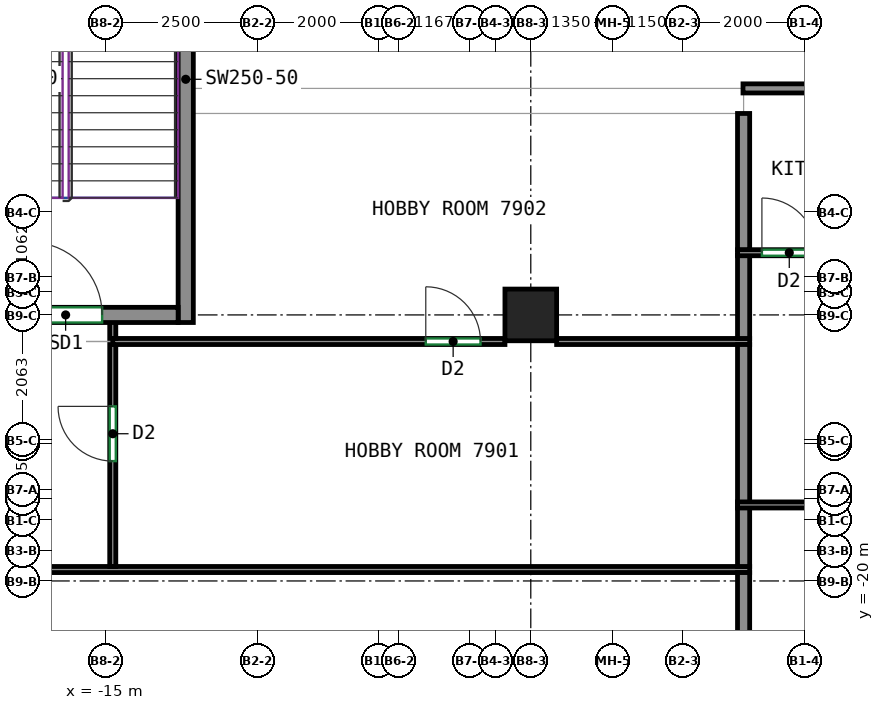
"""IFC4 building model, lengths in metres.
Left out: names, types, materials, properties, quantities, classifications, styles, units other than length and angle.
Written with IfcOpenShell. Run it as: python <this file> out.ifc"""

import sys

from ifc_helpers import new_model, si_unit, direction, frame, frame_2d, origin, origin_2d, place, context, subcontext, project, spatial, rectangle, extrude, source, transform, mapped, element, fill, save


model = new_model("IFC4")
c1 = context("Model", 3, precision=1e-05, world=origin(), true_north=direction((0.0, 1.0)))
c2 = subcontext(c1, "Body", "Model", "MODEL_VIEW")
j1 = project(units=[si_unit("LENGTHUNIT", "METRE"), si_unit("PLANEANGLEUNIT", "RADIAN")], contexts=[c1])
p1 = place(None, origin())
s1 = spatial("IfcSite", under=j1, at=p1, CompositionType="ELEMENT")
p2 = place(p1, origin())
s2 = spatial("IfcBuilding", under=s1, at=p2, CompositionType="ELEMENT")
p3 = place(p2, frame((0.0, 0.0, 315.4)))
s3 = spatial("IfcBuildingStorey", under=s2, at=p3, CompositionType="ELEMENT", Elevation=315.4)
m1 = source(origin(), c2, "Body", "SweptSolid", [
    extrude(rectangle(XDim=0.85, YDim=0.85, at=origin_2d()), origin(), (0.0, 0.0, 1.0), 3.0),
])
p4 = place(p3, frame((-8.0, -15.625, 0.0), z_axis=(0.0, 0.0, 1.0), x_axis=(1.0, 0.0, 0.0)))
e1 = element("IfcColumn", 1, at=p4, inside=s3, PredefinedType="COLUMN", context=c2, shape_type="MappedRepresentation", body=[
    mapped(m1, transform((0.0, 0.0, 0.0))),
])
m2 = source(origin(), c2, "Body", "SweptSolid", [
    extrude(rectangle(XDim=8.0, YDim=0.25, at=frame_2d((4.0, 0.0))), origin(), (0.0, 0.0, 1.0), 3.0),
])
p5 = place(p3, frame((-13.675, -15.75, 0.0), z_axis=(0.0, 0.0, 1.0), x_axis=(0.0, 1.0, 0.0)))
e2 = element("IfcWall", 2, at=p5, inside=s3, PredefinedType="SHEAR", context=c2, shape_type="MappedRepresentation", body=[
    mapped(m2, transform((0.0, 0.0, 0.0))),
])
m3 = source(origin(), c2, "Body", "SweptSolid", [
    extrude(rectangle(XDim=3.7, YDim=0.25, at=frame_2d((1.85, 0.0))), origin(), (0.0, 0.0, 1.0), 3.0),
])
p6 = place(p3, frame((-17.5, -15.625, 0.0), z_axis=(0.0, 0.0, 1.0), x_axis=(1.0, 0.0, 0.0)))
e3 = element("IfcWall", 3, at=p6, inside=s3, PredefinedType="SHEAR", context=c2, shape_type="MappedRepresentation", body=[
    mapped(m3, transform((0.0, 0.0, 0.0))),
])
p7 = place(p6, frame((1.25, 0.0, 0.0)))
e4 = element("IfcOpeningElement", 4, at=p7, cuts=e3, PredefinedType="OPENING", context=c2, shape_type="SweptSolid", body=[
    extrude(rectangle(XDim=1.2, YDim=2.1, at=frame_2d((0.6, 1.05))), frame((0.0, 0.135, 0.0), z_axis=(0.0, -1.0, 0.0), x_axis=(1.0, 0.0, 0.0)), (0.0, 0.0, 1.0), 0.27),
])
p8 = place(p3, frame((-4.51, -11.9, 0.0), z_axis=(0.0, 0.0, 1.0), x_axis=(1.0, 0.0, 0.0)))
e5 = element("IfcWall", 5, at=p8, inside=s3, PredefinedType="PARTITIONING", context=c2, shape_type="SweptSolid", body=[
    extrude(rectangle(XDim=22.26, YDim=0.15, at=frame_2d((11.13, 0.0))), origin(), (0.0, 0.0, 1.0), 3.0),
])
p9 = place(p8, frame((9.866, 0.0, 0.0)))
e6 = element("IfcOpeningElement", 6, at=p9, cuts=e5, PredefinedType="OPENING", context=c2, shape_type="SweptSolid", body=[
    extrude(rectangle(XDim=1.0, YDim=2.1, at=frame_2d((0.5, 1.05))), frame((0.0, 0.085, 0.0), z_axis=(0.0, -1.0, 0.0), x_axis=(1.0, 0.0, 0.0)), (0.0, 0.0, 1.0), 0.17),
])
p10 = place(p3, frame((-24.75, -19.812, 0.0), z_axis=(0.0, 0.0, 1.0), x_axis=(1.0, 0.0, 0.0)))
e7 = element("IfcWall", 7, at=p10, inside=s3, PredefinedType="PARTITIONING", context=c2, shape_type="SweptSolid", body=[
    extrude(rectangle(XDim=20.35, YDim=0.1, at=frame_2d((10.175, 0.0))), origin(), (0.0, 0.0, 1.0), 3.0),
])
p11 = place(p10, frame((6.664, 0.0, 0.0)))
e8 = element("IfcOpeningElement", 8, at=p11, cuts=e7, PredefinedType="OPENING", context=c2, shape_type="SweptSolid", body=[
    extrude(rectangle(XDim=0.9, YDim=2.1, at=frame_2d((0.45, 1.05))), frame((0.0, 0.06, 0.0), z_axis=(0.0, -1.0, 0.0), x_axis=(1.0, 0.0, 0.0)), (0.0, 0.0, 1.0), 0.12),
])
p12 = place(p3, frame((-4.5, -23.25, 0.0), z_axis=(0.0, 0.0, 1.0), x_axis=(0.0, 1.0, 0.0)))
e9 = element("IfcWall", 9, at=p12, inside=s3, PredefinedType="PARTITIONING", context=c2, shape_type="SweptSolid", body=[
    extrude(rectangle(XDim=3.388, YDim=0.2, at=frame_2d((1.694, 0.0))), origin(), (0.0, 0.0, 1.0), 3.0),
])
p13 = place(p3, frame((-14.875, -19.762, 0.0), z_axis=(0.0, 0.0, 1.0), x_axis=(0.0, 1.0, 0.0)))
e10 = element("IfcWall", 10, at=p13, inside=s3, PredefinedType="PARTITIONING", context=c2, shape_type="SweptSolid", body=[
    extrude(rectangle(XDim=3.65, YDim=0.1, at=frame_2d((1.825, 0.0))), origin(), (0.0, 0.0, 1.0), 3.0),
])
p14 = place(p13, frame((1.733, 0.0, 0.0)))
e11 = element("IfcOpeningElement", 11, at=p14, cuts=e10, PredefinedType="OPENING", context=c2, shape_type="SweptSolid", body=[
    extrude(rectangle(XDim=0.9, YDim=2.1, at=frame_2d((0.45, 1.05))), frame((0.0, 0.06, 0.0), z_axis=(0.0, -1.0, 0.0), x_axis=(1.0, 0.0, 0.0)), (0.0, 0.0, 1.0), 0.12),
])
p15 = place(p3, frame((-7.575, -16.062, 0.0), z_axis=(0.0, 0.0, 1.0), x_axis=(1.0, 0.0, 0.0)))
e12 = element("IfcWall", 12, at=p15, inside=s3, PredefinedType="PARTITIONING", context=c2, shape_type="SweptSolid", body=[
    extrude(rectangle(XDim=3.175, YDim=0.1, at=frame_2d((1.587, 0.0))), origin(), (0.0, 0.0, 1.0), 3.0),
])
p16 = place(p3, frame((-14.875, -16.062, 0.0), z_axis=(0.0, 0.0, 1.0), x_axis=(1.0, 0.0, 0.0)))
e13 = element("IfcWall", 13, at=p16, inside=s3, PredefinedType="PARTITIONING", context=c2, shape_type="SweptSolid", body=[
    extrude(rectangle(XDim=6.45, YDim=0.1, at=frame_2d((3.225, 0.0))), origin(), (0.0, 0.0, 1.0), 3.0),
])
p17 = place(p16, frame((5.148, 0.0, 0.0)))
e14 = element("IfcOpeningElement", 14, at=p17, cuts=e13, PredefinedType="OPENING", context=c2, shape_type="SweptSolid", body=[
    extrude(rectangle(XDim=0.9, YDim=2.1, at=frame_2d((0.45, 1.05))), frame((0.0, 0.06, 0.0), z_axis=(0.0, -1.0, 0.0), x_axis=(1.0, 0.0, 0.0)), (0.0, 0.0, 1.0), 0.12),
])
p18 = place(p3, frame((-4.5, -18.71, 0.0), z_axis=(0.0, 0.0, 1.0), x_axis=(0.0, 1.0, 0.0)))
e15 = element("IfcWall", 15, at=p18, inside=s3, PredefinedType="PARTITIONING", context=c2, shape_type="SweptSolid", body=[
    extrude(rectangle(XDim=2.598, YDim=0.2, at=frame_2d((1.299, 0.0))), origin(), (0.0, 0.0, 1.0), 3.0),
])
p19 = place(p3, frame((-4.5, -19.762, 0.0), z_axis=(0.0, 0.0, 1.0), x_axis=(0.0, 1.0, 0.0)))
e16 = element("IfcWall", 16, at=p19, inside=s3, PredefinedType="PARTITIONING", context=c2, shape_type="SweptSolid", body=[
    extrude(rectangle(XDim=0.97, YDim=0.2, at=frame_2d((0.485, 0.0))), origin(), (0.0, 0.0, 1.0), 3.0),
])
p20 = place(p3, frame((-14.875, -16.012, 0.0), z_axis=(0.0, 0.0, 1.0), x_axis=(0.0, 1.0, 0.0)))
e17 = element("IfcWall", 17, at=p20, inside=s3, PredefinedType="PARTITIONING", context=c2, shape_type="SweptSolid", body=[
    extrude(rectangle(XDim=0.312, YDim=0.1, at=frame_2d((0.156, 0.0))), origin(), (0.0, 0.0, 1.0), 3.0),
])
p21 = place(p3, frame((-4.5, -16.012, 0.0), z_axis=(0.0, 0.0, 1.0), x_axis=(0.0, 1.0, 0.0)))
e18 = element("IfcWall", 18, at=p21, inside=s3, PredefinedType="PARTITIONING", context=c2, shape_type="SweptSolid", body=[
    extrude(rectangle(XDim=1.37, YDim=0.2, at=frame_2d((0.685, 0.0))), origin(), (0.0, 0.0, 1.0), 3.0),
])
p22 = place(p3, frame((-4.5, -14.56, 0.0), z_axis=(0.0, 0.0, 1.0), x_axis=(0.0, 1.0, 0.0)))
e19 = element("IfcWall", 19, at=p22, inside=s3, PredefinedType="PARTITIONING", context=c2, shape_type="SweptSolid", body=[
    extrude(rectangle(XDim=2.248, YDim=0.2, at=frame_2d((1.124, 0.0))), origin(), (0.0, 0.0, 1.0), 3.0),
])
p23 = place(p3, frame((-4.6, -14.602, 0.0), z_axis=(0.0, 0.0, 1.0), x_axis=(1.0, 0.0, 0.0)))
e20 = element("IfcWall", 20, at=p23, inside=s3, PredefinedType="PARTITIONING", context=c2, shape_type="SweptSolid", body=[
    extrude(rectangle(XDim=3.19, YDim=0.1, at=frame_2d((1.595, 0.0))), origin(), (0.0, 0.0, 1.0), 3.0),
])
p24 = place(p23, frame((0.401, 0.0, 0.0)))
e21 = element("IfcOpeningElement", 21, at=p24, cuts=e20, PredefinedType="OPENING", context=c2, shape_type="SweptSolid", body=[
    extrude(rectangle(XDim=0.9, YDim=2.1, at=frame_2d((0.45, 1.05))), frame((0.0, 0.06, 0.0), z_axis=(0.0, -1.0, 0.0), x_axis=(1.0, 0.0, 0.0)), (0.0, 0.0, 1.0), 0.12),
])
p25 = place(p3, frame((-4.6, -18.75, 0.0), z_axis=(0.0, 0.0, 1.0), x_axis=(1.0, 0.0, 0.0)))
e22 = element("IfcWall", 22, at=p25, inside=s3, PredefinedType="PARTITIONING", context=c2, shape_type="SweptSolid", body=[
    extrude(rectangle(XDim=27.85, YDim=0.1, at=frame_2d((13.925, 0.0))), origin(), (0.0, 0.0, 1.0), 3.0),
])
p26 = place(p25, frame((3.741, 0.0, 0.0)))
e23 = element("IfcOpeningElement", 23, at=p26, cuts=e22, PredefinedType="OPENING", context=c2, shape_type="SweptSolid", body=[
    extrude(rectangle(XDim=0.9, YDim=2.1, at=frame_2d((0.45, 1.05))), frame((0.0, 0.06, 0.0), z_axis=(0.0, -1.0, 0.0), x_axis=(1.0, 0.0, 0.0)), (0.0, 0.0, 1.0), 0.12),
])
p27 = place(p25, frame((5.91, 0.0, 0.0)))
e24 = element("IfcOpeningElement", 24, at=p27, cuts=e22, PredefinedType="OPENING", context=c2, shape_type="SweptSolid", body=[
    extrude(rectangle(XDim=1.0, YDim=2.1, at=frame_2d((0.5, 1.05))), frame((0.0, 0.06, 0.0), z_axis=(0.0, -1.0, 0.0), x_axis=(1.0, 0.0, 0.0)), (0.0, 0.0, 1.0), 0.12),
])
p28 = place(p7, origin())
e25 = element("IfcDoor", 25, at=p28, inside=s3, OperationType="DOUBLE_DOOR_SINGLE_SWING", PredefinedType="DOOR", context=c2, shape_type="SweptSolid", body=[
    extrude(rectangle(XDim=1.2, YDim=2.1, at=frame_2d((0.6, 1.05))), frame((0.0, 0.025, 0.0), z_axis=(0.0, -1.0, 0.0), x_axis=(1.0, 0.0, 0.0)), (0.0, 0.0, 1.0), 0.05),
])
fill(e4, e25)
p29 = place(p14, origin())
e26 = element("IfcDoor", 26, at=p29, inside=s3, OperationType="SINGLE_SWING_RIGHT", PredefinedType="DOOR", context=c2, shape_type="SweptSolid", body=[
    extrude(rectangle(XDim=0.9, YDim=2.1, at=frame_2d((0.45, 1.05))), frame((0.0, 0.025, 0.0), z_axis=(0.0, -1.0, 0.0), x_axis=(1.0, 0.0, 0.0)), (0.0, 0.0, 1.0), 0.05),
])
fill(e11, e26)
p30 = place(p17, origin())
e27 = element("IfcDoor", 27, at=p30, inside=s3, OperationType="SINGLE_SWING_LEFT", PredefinedType="DOOR", context=c2, shape_type="SweptSolid", body=[
    extrude(rectangle(XDim=0.9, YDim=2.1, at=frame_2d((0.45, 1.05))), frame((0.0, 0.025, 0.0), z_axis=(0.0, -1.0, 0.0), x_axis=(1.0, 0.0, 0.0)), (0.0, 0.0, 1.0), 0.05),
])
fill(e14, e27)
p31 = place(p24, origin())
e28 = element("IfcDoor", 28, at=p31, inside=s3, OperationType="SINGLE_SWING_LEFT", PredefinedType="DOOR", context=c2, shape_type="SweptSolid", body=[
    extrude(rectangle(XDim=0.9, YDim=2.1, at=frame_2d((0.45, 1.05))), frame((0.0, 0.025, 0.0), z_axis=(0.0, -1.0, 0.0), x_axis=(1.0, 0.0, 0.0)), (0.0, 0.0, 1.0), 0.05),
])
fill(e21, e28)
save(model, sys.argv[1])
